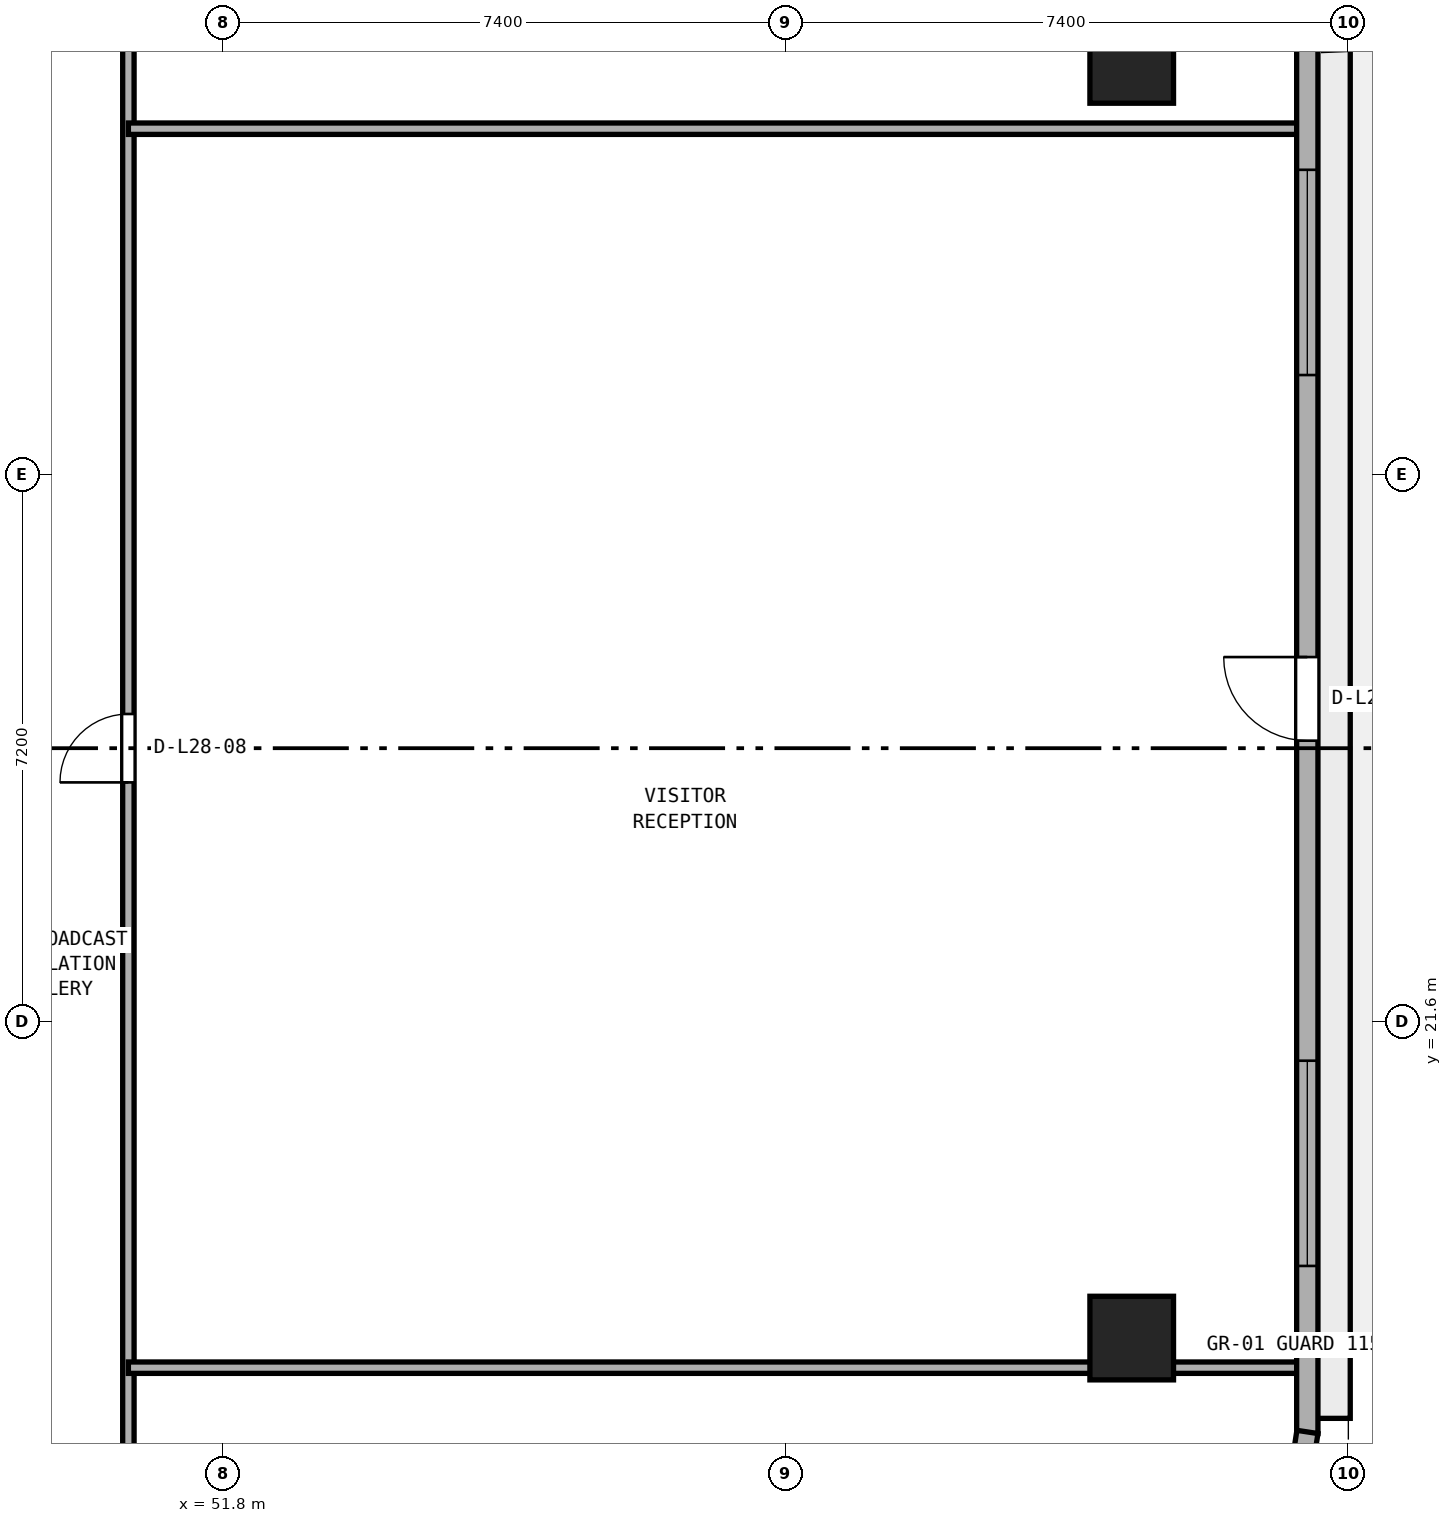
"""IFC4 building model, lengths in metres.
Left out: names, types, materials, properties, quantities, classifications, styles, units other than length and angle.
Written with IfcOpenShell. Run it as: python <this file> out.ifc"""

import sys

from ifc_helpers import new_model, si_unit, direction, frame, frame_2d, origin, origin_2d, place, context, subcontext, project, spatial, rectangle, extrude, element, fill, save


model = new_model("IFC4")
c1 = context("Model", 3, precision=1e-05, world=origin(), true_north=direction((0.0, 1.0)))
c2 = subcontext(c1, "Body", "Model", "MODEL_VIEW")
j1 = project(units=[si_unit("LENGTHUNIT", "METRE"), si_unit("PLANEANGLEUNIT", "RADIAN")], contexts=[c1])
p1 = place(None, origin())
s1 = spatial("IfcSite", under=j1, at=p1, CompositionType="ELEMENT")
p2 = place(p1, origin())
s2 = spatial("IfcBuilding", under=s1, at=p2, CompositionType="ELEMENT")
p3 = place(p2, frame((0.0, 0.0, 112.4)))
s3 = spatial("IfcBuildingStorey", under=s2, at=p3, CompositionType="ELEMENT", Elevation=112.4)
for number, where, z_axis, x_axis in (
    (1, (63.75, 17.44, 0.0), (0.0, 0.0, 1.0), (1.0, 0.0, 0.0)),
    (2, (63.75, 34.235, 0.0), (0.0, 0.0, 1.0), (1.0, 0.0, 0.0)),
):
    element("IfcColumn", number, at=place(p3, frame(where, z_axis=z_axis, x_axis=x_axis)), inside=s3, PredefinedType="COLUMN", context=c2, shape_type="SweptSolid", body=[
        extrude(rectangle(XDim=1.1, YDim=1.1, at=origin_2d()), origin(), (0.0, 0.0, 1.0), 3.8),
    ])
p4 = place(p3, frame((50.55, 15.05, 0.0), z_axis=(0.0, 0.0, 1.0), x_axis=(0.0, 1.0, 0.0)))
e3 = element("IfcWall", 3, at=p4, inside=s3, PredefinedType="PARTITIONING", context=c2, shape_type="SweptSolid", body=[
    extrude(rectangle(XDim=20.3, YDim=0.15, at=frame_2d((10.15, 0.0))), origin(), (0.0, 0.0, 1.0), 3.525),
])
p5 = place(p4, frame((9.7, 0.0, 0.0)))
e4 = element("IfcOpeningElement", 4, at=p5, cuts=e3, PredefinedType="OPENING", context=c2, shape_type="SweptSolid", body=[
    extrude(rectangle(XDim=0.9, YDim=2.1, at=frame_2d((0.45, 1.05))), frame((0.0, 0.085, 0.0), z_axis=(0.0, -1.0, 0.0), x_axis=(1.0, 0.0, 0.0)), (0.0, 0.0, 1.0), 0.17),
])
p6 = place(p3, frame((50.55, 17.05, 0.0), z_axis=(0.0, 0.0, 1.0), x_axis=(1.0, 0.0, 0.0)))
e5 = element("IfcWall", 5, at=p6, inside=s3, PredefinedType="PARTITIONING", context=c2, shape_type="SweptSolid", body=[
    extrude(rectangle(XDim=15.445, YDim=0.15, at=frame_2d((7.723, 0.0))), origin(), (0.0, 0.0, 1.0), 3.525),
])
p7 = place(p3, frame((50.55, 33.35, 0.0), z_axis=(0.0, 0.0, 1.0), x_axis=(1.0, 0.0, 0.0)))
e6 = element("IfcWall", 6, at=p7, inside=s3, PredefinedType="PARTITIONING", context=c2, shape_type="SweptSolid", body=[
    extrude(rectangle(XDim=15.445, YDim=0.15, at=frame_2d((7.723, 0.0))), origin(), (0.0, 0.0, 1.0), 2.908),
])
p8 = place(p3, frame((66.06, 16.183, 0.0), z_axis=(0.0, 0.0, 1.0), x_axis=(0.0, 1.0, 0.0)))
e7 = element("IfcWall", 7, at=p8, inside=s3, PredefinedType="STANDARD", context=c2, shape_type="SweptSolid", body=[
    extrude(rectangle(XDim=19.331, YDim=0.28, at=frame_2d((9.666, 0.0))), origin(), (0.0, 0.0, 1.0), 3.525),
])
p9 = place(p8, frame((9.115, 0.0, 0.0)))
e8 = element("IfcOpeningElement", 8, at=p9, cuts=e7, PredefinedType="OPENING", context=c2, shape_type="SweptSolid", body=[
    extrude(rectangle(XDim=1.1, YDim=2.2, at=frame_2d((0.55, 1.1))), frame((0.0, 0.15, 0.0), z_axis=(0.0, -1.0, 0.0), x_axis=(1.0, 0.0, 0.0)), (0.0, 0.0, 1.0), 0.3),
])
p10 = place(p8, frame((2.205, 0.0, 0.9)))
e9 = element("IfcOpeningElement", 9, at=p10, cuts=e7, PredefinedType="OPENING", context=c2, shape_type="SweptSolid", body=[
    extrude(rectangle(XDim=2.7, YDim=1.75, at=frame_2d((1.35, 0.875))), frame((0.0, 0.15, 0.0), z_axis=(0.0, -1.0, 0.0), x_axis=(1.0, 0.0, 0.0)), (0.0, 0.0, 1.0), 0.3),
])
p11 = place(p8, frame((13.926, 0.0, 0.9)))
e10 = element("IfcOpeningElement", 10, at=p11, cuts=e7, PredefinedType="OPENING", context=c2, shape_type="SweptSolid", body=[
    extrude(rectangle(XDim=2.7, YDim=1.75, at=frame_2d((1.35, 0.875))), frame((0.0, 0.15, 0.0), z_axis=(0.0, -1.0, 0.0), x_axis=(1.0, 0.0, 0.0)), (0.0, 0.0, 1.0), 0.3),
])
p12 = place(p3, frame((65.867, 14.943, 0.0), z_axis=(0.0, 0.0, 1.0), x_axis=(0.152014078361, 0.988378328364, 0.0)))
e11 = element("IfcWall", 11, at=p12, inside=s3, PredefinedType="STANDARD", context=c2, shape_type="SweptSolid", body=[
    extrude(rectangle(XDim=1.277, YDim=0.28, at=frame_2d((0.638, 0.0))), origin(), (0.0, 0.0, 1.0), 3.525),
])
p13 = place(p5, origin())
e12 = element("IfcDoor", 12, at=p13, inside=s3, OperationType="SINGLE_SWING_LEFT", PredefinedType="DOOR", context=c2, shape_type="SweptSolid", body=[
    extrude(rectangle(XDim=0.9, YDim=2.1, at=frame_2d((0.45, 1.05))), frame((0.0, 0.025, 0.0), z_axis=(0.0, -1.0, 0.0), x_axis=(1.0, 0.0, 0.0)), (0.0, 0.0, 1.0), 0.05),
])
fill(e4, e12)
p14 = place(p9, origin())
e13 = element("IfcDoor", 13, at=p14, inside=s3, OperationType="SINGLE_SWING_RIGHT", PredefinedType="DOOR", context=c2, shape_type="SweptSolid", body=[
    extrude(rectangle(XDim=1.1, YDim=2.2, at=frame_2d((0.55, 1.1))), frame((0.0, 0.025, 0.0), z_axis=(0.0, -1.0, 0.0), x_axis=(1.0, 0.0, 0.0)), (0.0, 0.0, 1.0), 0.05),
])
fill(e8, e13)
p15 = place(p10, origin())
e14 = element("IfcWindow", 14, at=p15, inside=s3, PartitioningType="SINGLE_PANEL", PredefinedType="WINDOW", context=c2, shape_type="SweptSolid", body=[
    extrude(rectangle(XDim=2.7, YDim=1.75, at=frame_2d((1.35, 0.875))), frame((0.0, 0.03, 0.0), z_axis=(0.0, -1.0, 0.0), x_axis=(1.0, 0.0, 0.0)), (0.0, 0.0, 1.0), 0.06),
])
fill(e9, e14)
p16 = place(p11, origin())
e15 = element("IfcWindow", 15, at=p16, inside=s3, PartitioningType="SINGLE_PANEL", PredefinedType="WINDOW", context=c2, shape_type="SweptSolid", body=[
    extrude(rectangle(XDim=2.7, YDim=1.75, at=frame_2d((1.35, 0.875))), frame((0.0, 0.03, 0.0), z_axis=(0.0, -1.0, 0.0), x_axis=(1.0, 0.0, 0.0)), (0.0, 0.0, 1.0), 0.06),
])
fill(e10, e15)
save(model, sys.argv[1])
